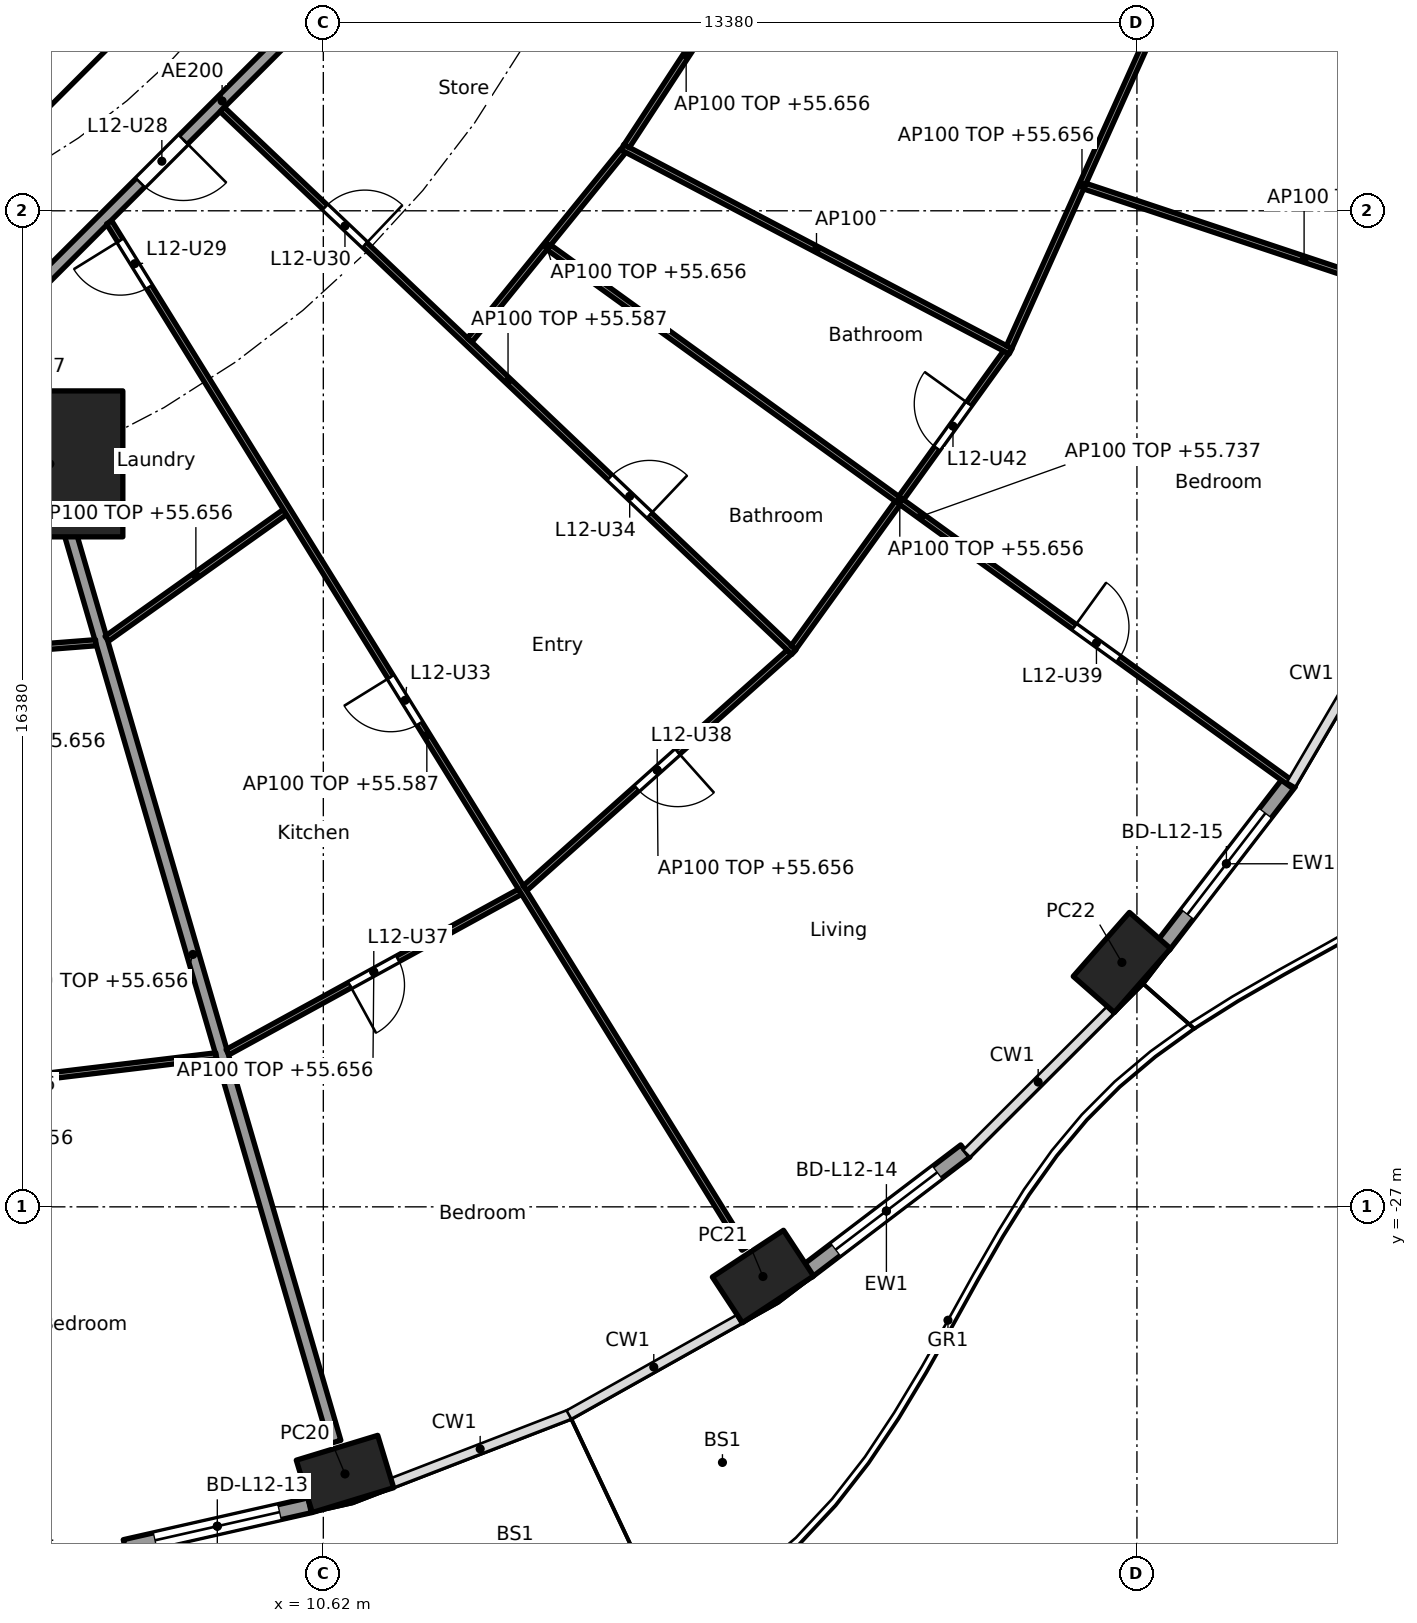
"""IFC4 building model, lengths in metres.
Left out: names, types, materials, properties, quantities, classifications, styles, units other than length and angle.
Written with IfcOpenShell. Run it as: python <this file> out.ifc"""

import sys

from ifc_helpers import new_model, si_unit, direction, frame, frame_2d, origin, origin_2d, place, context, subcontext, project, spatial, rectangle, hollow_rectangle, extrude, element, fill, save


model = new_model("IFC4")
c1 = context("Model", 3, precision=1e-05, world=origin(), true_north=direction((0.0, 1.0)))
c2 = subcontext(c1, "Body", "Model", "MODEL_VIEW")
j1 = project(units=[si_unit("LENGTHUNIT", "METRE"), si_unit("PLANEANGLEUNIT", "RADIAN")], contexts=[c1])
p1 = place(None, origin())
s1 = spatial("IfcSite", under=j1, at=p1, CompositionType="ELEMENT")
p2 = place(p1, origin())
s2 = spatial("IfcBuilding", under=s1, at=p2, CompositionType="ELEMENT")
p3 = place(p2, frame((0.0, 0.0, 52.9)))
s3 = spatial("IfcBuildingStorey", under=s2, at=p3, CompositionType="ELEMENT", Elevation=52.9)
for number, where, z_axis, x_axis in (
    (1, (10.976, -31.393, 0.0), (0.0, 0.0, 1.0), (0.957, 0.292, 0.0)),
    (2, (17.85, -28.146, 0.0), (0.0, 0.0, 1.0), (0.836, 0.549, 0.0)),
    (3, (23.752, -22.981, 0.0), (0.0, 0.0, 1.0), (0.66, 0.751, 0.0)),
):
    element("IfcColumn", number, at=place(p3, frame(where, z_axis=z_axis, x_axis=x_axis)), inside=s3, PredefinedType="COLUMN", context=c2, shape_type="SweptSolid", body=[
        extrude(hollow_rectangle(XDim=1.4, YDim=0.9, WallThickness=0.05, at=origin_2d()), origin(), (0.0, 0.0, 1.0), 3.7),
    ])
p4 = place(p3, frame((6.123, -14.782, 0.0), z_axis=(0.0, 0.0, 1.0), x_axis=(1.0, 0.0, 0.0)))
e4 = element("IfcColumn", 4, at=p4, inside=s3, PredefinedType="COLUMN", context=c2, shape_type="SweptSolid", body=[
    extrude(rectangle(XDim=2.4, YDim=2.4, at=origin_2d()), origin(), (0.0, 0.0, 1.0), 3.7),
])
p5 = place(p3, frame((10.396, -31.908, 0.0), z_axis=(0.0, 0.0, 1.0), x_axis=(-0.97533495413, -0.220729987208, 0.0)))
e5 = element("IfcWall", 5, at=p5, inside=s3, PredefinedType="SOLIDWALL", context=c2, shape_type="SweptSolid", body=[
    extrude(rectangle(XDim=3.115, YDim=0.25, at=frame_2d((1.557, 0.0))), origin(), (0.0, 0.0, 1.0), 3.44),
])
p6 = place(p5, frame((0.507, 0.0, 0.0)))
e6 = element("IfcOpeningElement", 6, at=p6, cuts=e5, PredefinedType="OPENING", context=c2, shape_type="SweptSolid", body=[
    extrude(rectangle(XDim=2.1, YDim=2.4, at=frame_2d((1.05, 1.2))), frame((0.0, 0.135, 0.0), z_axis=(0.0, -1.0, 0.0), x_axis=(1.0, 0.0, 0.0)), (0.0, 0.0, 1.0), 0.27),
])
p7 = place(p3, frame((21.178, -26.081, 0.0), z_axis=(0.0, 0.0, 1.0), x_axis=(-0.796022293214, -0.605267303517, 0.0)))
e7 = element("IfcWall", 7, at=p7, inside=s3, PredefinedType="SOLIDWALL", context=c2, shape_type="SweptSolid", body=[
    extrude(rectangle(XDim=3.262, YDim=0.25, at=frame_2d((1.631, 0.0))), origin(), (0.0, 0.0, 1.0), 3.44),
])
p8 = place(p7, frame((0.581, 0.0, 0.0)))
e8 = element("IfcOpeningElement", 8, at=p8, cuts=e7, PredefinedType="OPENING", context=c2, shape_type="SweptSolid", body=[
    extrude(rectangle(XDim=2.1, YDim=2.4, at=frame_2d((1.05, 1.2))), frame((0.0, 0.135, 0.0), z_axis=(0.0, -1.0, 0.0), x_axis=(1.0, 0.0, 0.0)), (0.0, 0.0, 1.0), 0.27),
])
p9 = place(p3, frame((26.508, -20.013, 0.0), z_axis=(0.0, 0.0, 1.0), x_axis=(-0.610457147657, -0.792049285635, 0.0)))
e9 = element("IfcWall", 9, at=p9, inside=s3, PredefinedType="SOLIDWALL", context=c2, shape_type="SweptSolid", body=[
    extrude(rectangle(XDim=3.397, YDim=0.25, at=frame_2d((1.699, 0.0))), origin(), (0.0, 0.0, 1.0), 3.44),
])
p10 = place(p9, frame((0.649, 0.0, 0.0)))
e10 = element("IfcOpeningElement", 10, at=p10, cuts=e9, PredefinedType="OPENING", context=c2, shape_type="SweptSolid", body=[
    extrude(rectangle(XDim=2.1, YDim=2.4, at=frame_2d((1.05, 1.2))), frame((0.0, 0.135, 0.0), z_axis=(0.0, -1.0, 0.0), x_axis=(1.0, 0.0, 0.0)), (0.0, 0.0, 1.0), 0.27),
])
p11 = place(p3, frame((4.613, -9.988, 0.0), z_axis=(0.0, 0.0, 1.0), x_axis=(0.707106781187, 0.707106781187, 0.0)))
e11 = element("IfcWall", 11, at=p11, inside=s3, PredefinedType="SHEAR", context=c2, shape_type="SweptSolid", body=[
    extrude(rectangle(XDim=7.602, YDim=0.6, at=frame_2d((3.801, 0.0))), origin(), (0.0, 0.0, 1.0), 3.44),
])
p12 = place(p11, frame((3.201, 0.0, 0.0)))
e12 = element("IfcOpeningElement", 12, at=p12, cuts=e11, PredefinedType="OPENING", context=c2, shape_type="SweptSolid", body=[
    extrude(rectangle(XDim=1.2, YDim=2.1, at=frame_2d((0.6, 1.05))), frame((0.0, 0.31, 0.0), z_axis=(0.0, -1.0, 0.0), x_axis=(1.0, 0.0, 0.0)), (0.0, 0.0, 1.0), 0.62),
])
p13 = place(p3, frame((5.243, -12.657, 0.0), z_axis=(0.0, 0.0, 1.0), x_axis=(0.382707856524, -0.923869415315, 0.0)))
e13 = element("IfcWall", 13, at=p13, inside=s3, PredefinedType="PARTITIONING", context=c2, shape_type="SweptSolid", body=[
    extrude(rectangle(XDim=2.2, YDim=0.2, at=frame_2d((1.1, 0.0))), origin(), (0.0, 0.0, 1.0), 3.44),
])
p14 = place(p3, frame((6.137, -14.83, 0.0), z_axis=(0.0, 0.0, 1.0), x_axis=(0.27985745069, -0.960041565399, 0.0)))
e14 = element("IfcWall", 14, at=p14, inside=s3, PredefinedType="PARTITIONING", context=c2, shape_type="SweptSolid", body=[
    extrude(rectangle(XDim=16.705, YDim=0.2, at=frame_2d((8.353, 0.0))), origin(), (0.0, 0.0, 1.0), 2.756),
])
p15 = place(p3, frame((5.275, -12.494, 0.0), z_axis=(0.0, 0.0, 1.0), x_axis=(0.707106781187, 0.707106781187, 0.0)))
e15 = element("IfcWall", 15, at=p15, inside=s3, PredefinedType="PARTITIONING", context=c2, shape_type="SweptSolid", body=[
    extrude(rectangle(XDim=10.409, YDim=0.2, at=frame_2d((5.205, 0.0))), origin(), (0.0, 0.0, 1.0), 3.44),
])
p16 = place(p15, frame((3.303, 0.0, 0.0)))
e16 = element("IfcOpeningElement", 16, at=p16, cuts=e15, PredefinedType="OPENING", context=c2, shape_type="SweptSolid", body=[
    extrude(rectangle(XDim=1.0, YDim=2.1, at=frame_2d((0.5, 1.05))), frame((0.0, 0.11, 0.0), z_axis=(0.0, -1.0, 0.0), x_axis=(1.0, 0.0, 0.0)), (0.0, 0.0, 1.0), 0.22),
])
p17 = place(p3, frame((2.288, -18.078, 0.0), z_axis=(0.0, 0.0, 1.0), x_axis=(0.99701850123, 0.077162868047, 0.0)))
e17 = element("IfcWall", 17, at=p17, inside=s3, PredefinedType="PARTITIONING", context=c2, shape_type="SweptSolid", body=[
    extrude(rectangle(XDim=4.604, YDim=0.1, at=frame_2d((2.302, 0.0))), origin(), (0.0, 0.0, 1.0), 2.756),
])
p18 = place(p17, frame((1.852, 0.0, 0.0)))
e18 = element("IfcOpeningElement", 18, at=p18, cuts=e17, PredefinedType="OPENING", context=c2, shape_type="SweptSolid", body=[
    extrude(rectangle(XDim=0.9, YDim=2.1, at=frame_2d((0.45, 1.05))), frame((0.0, 0.06, 0.0), z_axis=(0.0, -1.0, 0.0), x_axis=(1.0, 0.0, 0.0)), (0.0, 0.0, 1.0), 0.12),
])
p19 = place(p3, frame((2.941, -25.229, 0.0), z_axis=(0.0, 0.0, 1.0), x_axis=(0.992834127896, 0.119500604542, 0.0)))
e19 = element("IfcWall", 19, at=p19, inside=s3, PredefinedType="PARTITIONING", context=c2, shape_type="SweptSolid", body=[
    extrude(rectangle(XDim=5.959, YDim=0.1, at=frame_2d((2.98, 0.0))), origin(), (0.0, 0.0, 1.0), 2.756),
])
p20 = place(p3, frame((7.06, -17.657, 0.0), z_axis=(0.0, 0.0, 1.0), x_axis=(0.81492039338, 0.57957290521, 0.0)))
e20 = element("IfcWall", 20, at=p20, inside=s3, PredefinedType="PARTITIONING", context=c2, shape_type="SweptSolid", body=[
    extrude(rectangle(XDim=3.594, YDim=0.1, at=frame_2d((1.797, 0.0))), origin(), (0.0, 0.0, 1.0), 2.756),
])
p21 = place(p3, frame((9.045, -24.456, 0.0), z_axis=(0.0, 0.0, 1.0), x_axis=(0.876809987787, 0.480837025734, 0.0)))
e21 = element("IfcWall", 21, at=p21, inside=s3, PredefinedType="PARTITIONING", context=c2, shape_type="SweptSolid", body=[
    extrude(rectangle(XDim=5.486, YDim=0.1, at=frame_2d((2.743, 0.0))), origin(), (0.0, 0.0, 1.0), 2.756),
])
p22 = place(p21, frame((2.293, 0.0, 0.0)))
e22 = element("IfcOpeningElement", 22, at=p22, cuts=e21, PredefinedType="OPENING", context=c2, shape_type="SweptSolid", body=[
    extrude(rectangle(XDim=0.9, YDim=2.1, at=frame_2d((0.45, 1.05))), frame((0.0, 0.06, 0.0), z_axis=(0.0, -1.0, 0.0), x_axis=(1.0, 0.0, 0.0)), (0.0, 0.0, 1.0), 0.12),
])
p23 = place(p3, frame((7.097, -10.81, 0.0), z_axis=(0.0, 0.0, 1.0), x_axis=(0.526453266471, -0.850204068576, 0.0)))
e23 = element("IfcWall", 23, at=p23, inside=s3, PredefinedType="PARTITIONING", context=c2, shape_type="SweptSolid", body=[
    extrude(rectangle(XDim=19.85, YDim=0.1, at=frame_2d((9.925, 0.0))), origin(), (0.0, 0.0, 1.0), 2.687),
])
p24 = place(p23, frame((0.35, 0.0, 0.0)))
e24 = element("IfcOpeningElement", 24, at=p24, cuts=e23, PredefinedType="OPENING", context=c2, shape_type="SweptSolid", body=[
    extrude(rectangle(XDim=0.9, YDim=2.1, at=frame_2d((0.45, 1.05))), frame((0.0, 0.06, 0.0), z_axis=(0.0, -1.0, 0.0), x_axis=(1.0, 0.0, 0.0)), (0.0, 0.0, 1.0), 0.12),
])
p25 = place(p23, frame((8.795, 0.0, 0.0)))
e25 = element("IfcOpeningElement", 25, at=p25, cuts=e23, PredefinedType="OPENING", context=c2, shape_type="SweptSolid", body=[
    extrude(rectangle(XDim=0.9, YDim=2.1, at=frame_2d((0.45, 1.05))), frame((0.0, 0.06, 0.0), z_axis=(0.0, -1.0, 0.0), x_axis=(1.0, 0.0, 0.0)), (0.0, 0.0, 1.0), 0.12),
])
p26 = place(p3, frame((13.936, -21.761, 0.0), z_axis=(0.0, 0.0, 1.0), x_axis=(0.745806142791, 0.666163041136, 0.0)))
e26 = element("IfcWall", 26, at=p26, inside=s3, PredefinedType="PARTITIONING", context=c2, shape_type="SweptSolid", body=[
    extrude(rectangle(XDim=5.831, YDim=0.1, at=frame_2d((2.915, 0.0))), origin(), (0.0, 0.0, 1.0), 2.756),
])
p27 = place(p26, frame((2.465, 0.0, 0.0)))
e27 = element("IfcOpeningElement", 27, at=p27, cuts=e26, PredefinedType="OPENING", context=c2, shape_type="SweptSolid", body=[
    extrude(rectangle(XDim=0.9, YDim=2.1, at=frame_2d((0.45, 1.05))), frame((0.0, 0.06, 0.0), z_axis=(0.0, -1.0, 0.0), x_axis=(1.0, 0.0, 0.0)), (0.0, 0.0, 1.0), 0.12),
])
p28 = place(p3, frame((8.957, -8.953, 0.0), z_axis=(0.0, 0.0, 1.0), x_axis=(0.725250022034, -0.688485588476, 0.0)))
e28 = element("IfcWall", 28, at=p28, inside=s3, PredefinedType="PARTITIONING", context=c2, shape_type="SweptSolid", body=[
    extrude(rectangle(XDim=12.963, YDim=0.1, at=frame_2d((6.481, 0.0))), origin(), (0.0, 0.0, 1.0), 2.687),
])
p29 = place(p28, frame((2.333, 0.0, 0.0)))
e29 = element("IfcOpeningElement", 29, at=p29, cuts=e28, PredefinedType="OPENING", context=c2, shape_type="SweptSolid", body=[
    extrude(rectangle(XDim=0.9, YDim=2.1, at=frame_2d((0.45, 1.05))), frame((0.0, 0.06, 0.0), z_axis=(0.0, -1.0, 0.0), x_axis=(1.0, 0.0, 0.0)), (0.0, 0.0, 1.0), 0.12),
])
p30 = place(p28, frame((8.79, 0.0, 0.0)))
e30 = element("IfcOpeningElement", 30, at=p30, cuts=e28, PredefinedType="OPENING", context=c2, shape_type="SweptSolid", body=[
    extrude(rectangle(XDim=0.9, YDim=2.1, at=frame_2d((0.45, 1.05))), frame((0.0, 0.06, 0.0), z_axis=(0.0, -1.0, 0.0), x_axis=(1.0, 0.0, 0.0)), (0.0, 0.0, 1.0), 0.12),
])
p31 = place(p3, frame((13.026, -12.747, 0.0), z_axis=(0.0, 0.0, 1.0), x_axis=(0.630126826288, 0.776492229705, 0.0)))
e31 = element("IfcWall", 31, at=p31, inside=s3, PredefinedType="PARTITIONING", context=c2, shape_type="SweptSolid", body=[
    extrude(rectangle(XDim=4.007, YDim=0.1, at=frame_2d((2.003, 0.0))), origin(), (0.0, 0.0, 1.0), 2.756),
])
p32 = place(p3, frame((18.351, -17.803, 0.0), z_axis=(0.0, 0.0, 1.0), x_axis=(0.584563700282, 0.811347817099, 0.0)))
e32 = element("IfcWall", 32, at=p32, inside=s3, PredefinedType="PARTITIONING", context=c2, shape_type="SweptSolid", body=[
    extrude(rectangle(XDim=5.984, YDim=0.1, at=frame_2d((2.992, 0.0))), origin(), (0.0, 0.0, 1.0), 2.756),
])
p33 = place(p32, frame((4.038, 0.0, 0.0)))
e33 = element("IfcOpeningElement", 33, at=p33, cuts=e32, PredefinedType="OPENING", context=c2, shape_type="SweptSolid", body=[
    extrude(rectangle(XDim=0.9, YDim=2.1, at=frame_2d((0.45, 1.05))), frame((0.0, 0.06, 0.0), z_axis=(0.0, -1.0, 0.0), x_axis=(1.0, 0.0, 0.0)), (0.0, 0.0, 1.0), 0.12),
])
p34 = place(p3, frame((14.329, -11.221, 0.0), z_axis=(0.0, 0.0, 1.0), x_axis=(0.810671130917, -0.58550176558, 0.0)))
e34 = element("IfcWall", 34, at=p34, inside=s3, PredefinedType="PARTITIONING", context=c2, shape_type="SweptSolid", body=[
    extrude(rectangle(XDim=15.106, YDim=0.1, at=frame_2d((7.553, 0.0))), origin(), (0.0, 0.0, 1.0), 2.837),
])
p35 = place(p34, frame((10.659, 0.0, 0.0)))
e35 = element("IfcOpeningElement", 35, at=p35, cuts=e34, PredefinedType="OPENING", context=c2, shape_type="SweptSolid", body=[
    extrude(rectangle(XDim=0.9, YDim=2.1, at=frame_2d((0.45, 1.05))), frame((0.0, 0.06, 0.0), z_axis=(0.0, -1.0, 0.0), x_axis=(1.0, 0.0, 0.0)), (0.0, 0.0, 1.0), 0.12),
])
p36 = place(p3, frame((15.538, -9.574, 0.0), z_axis=(0.0, 0.0, 1.0), x_axis=(0.88517945493, -0.465249752895, 0.0)))
e36 = element("IfcWall", 36, at=p36, inside=s3, PredefinedType="PARTITIONING", context=c2, shape_type="SweptSolid", body=[
    extrude(rectangle(XDim=7.213, YDim=0.1, at=frame_2d((3.606, 0.0))), origin(), (0.0, 0.0, 1.0), 3.44),
])
p37 = place(p3, frame((15.609, -9.556, 0.0), z_axis=(0.0, 0.0, 1.0), x_axis=(0.547641765292, 0.836712911881, 0.0)))
e37 = element("IfcWall", 37, at=p37, inside=s3, PredefinedType="PARTITIONING", context=c2, shape_type="SweptSolid", body=[
    extrude(rectangle(XDim=3.57, YDim=0.1, at=frame_2d((1.785, 0.0))), origin(), (0.0, 0.0, 1.0), 2.756),
])
p38 = place(p3, frame((21.899, -12.861, 0.0), z_axis=(0.0, 0.0, 1.0), x_axis=(0.410197710154, 0.911996622025, 0.0)))
e38 = element("IfcWall", 38, at=p38, inside=s3, PredefinedType="PARTITIONING", context=c2, shape_type="SweptSolid", body=[
    extrude(rectangle(XDim=5.837, YDim=0.1, at=frame_2d((2.918, 0.0))), origin(), (0.0, 0.0, 1.0), 2.756),
])
p39 = place(p3, frame((23.144, -10.216, 0.0), z_axis=(0.0, 0.0, 1.0), x_axis=(0.948811715359, -0.315842253027, 0.0)))
e39 = element("IfcWall", 39, at=p39, inside=s3, PredefinedType="PARTITIONING", context=c2, shape_type="SweptSolid", body=[
    extrude(rectangle(XDim=7.6, YDim=0.1, at=frame_2d((3.8, 0.0))), origin(), (0.0, 0.0, 1.0), 2.837),
])
p40 = place(p6, origin())
e40 = element("IfcDoor", 40, at=p40, inside=s3, OperationType="SLIDING_TO_LEFT", PredefinedType="DOOR", context=c2, shape_type="SweptSolid", body=[
    extrude(rectangle(XDim=2.1, YDim=2.4, at=frame_2d((1.05, 1.2))), frame((0.0, 0.025, 0.0), z_axis=(0.0, -1.0, 0.0), x_axis=(1.0, 0.0, 0.0)), (0.0, 0.0, 1.0), 0.05),
])
fill(e6, e40)
p41 = place(p8, origin())
e41 = element("IfcDoor", 41, at=p41, inside=s3, OperationType="SLIDING_TO_LEFT", PredefinedType="DOOR", context=c2, shape_type="SweptSolid", body=[
    extrude(rectangle(XDim=2.1, YDim=2.4, at=frame_2d((1.05, 1.2))), frame((0.0, 0.025, 0.0), z_axis=(0.0, -1.0, 0.0), x_axis=(1.0, 0.0, 0.0)), (0.0, 0.0, 1.0), 0.05),
])
fill(e8, e41)
p42 = place(p10, origin())
e42 = element("IfcDoor", 42, at=p42, inside=s3, OperationType="SLIDING_TO_LEFT", PredefinedType="DOOR", context=c2, shape_type="SweptSolid", body=[
    extrude(rectangle(XDim=2.1, YDim=2.4, at=frame_2d((1.05, 1.2))), frame((0.0, 0.025, 0.0), z_axis=(0.0, -1.0, 0.0), x_axis=(1.0, 0.0, 0.0)), (0.0, 0.0, 1.0), 0.05),
])
fill(e10, e42)
p43 = place(p16, frame((1.0, 0.0, 0.0), x_axis=(-1.0, 0.0, 0.0)))
e43 = element("IfcDoor", 43, at=p43, inside=s3, OperationType="SINGLE_SWING_LEFT", PredefinedType="DOOR", context=c2, shape_type="SweptSolid", body=[
    extrude(rectangle(XDim=1.0, YDim=2.1, at=frame_2d((0.5, 1.05))), frame((0.0, 0.025, 0.0), z_axis=(0.0, -1.0, 0.0), x_axis=(1.0, 0.0, 0.0)), (0.0, 0.0, 1.0), 0.05),
])
fill(e16, e43)
p44 = place(p24, frame((0.9, 0.0, 0.0), x_axis=(-1.0, 0.0, 0.0)))
e44 = element("IfcDoor", 44, at=p44, inside=s3, OperationType="SINGLE_SWING_RIGHT", PredefinedType="DOOR", context=c2, shape_type="SweptSolid", body=[
    extrude(rectangle(XDim=0.9, YDim=2.1, at=frame_2d((0.45, 1.05))), frame((0.0, 0.025, 0.0), z_axis=(0.0, -1.0, 0.0), x_axis=(1.0, 0.0, 0.0)), (0.0, 0.0, 1.0), 0.05),
])
fill(e24, e44)
p45 = place(p29, origin())
e45 = element("IfcDoor", 45, at=p45, inside=s3, OperationType="SINGLE_SWING_RIGHT", PredefinedType="DOOR", context=c2, shape_type="SweptSolid", body=[
    extrude(rectangle(XDim=0.9, YDim=2.1, at=frame_2d((0.45, 1.05))), frame((0.0, 0.025, 0.0), z_axis=(0.0, -1.0, 0.0), x_axis=(1.0, 0.0, 0.0)), (0.0, 0.0, 1.0), 0.05),
])
fill(e29, e45)
p46 = place(p25, frame((0.9, 0.0, 0.0), x_axis=(-1.0, 0.0, 0.0)))
e46 = element("IfcDoor", 46, at=p46, inside=s3, OperationType="SINGLE_SWING_RIGHT", PredefinedType="DOOR", context=c2, shape_type="SweptSolid", body=[
    extrude(rectangle(XDim=0.9, YDim=2.1, at=frame_2d((0.45, 1.05))), frame((0.0, 0.025, 0.0), z_axis=(0.0, -1.0, 0.0), x_axis=(1.0, 0.0, 0.0)), (0.0, 0.0, 1.0), 0.05),
])
fill(e25, e46)
p47 = place(p30, origin())
e47 = element("IfcDoor", 47, at=p47, inside=s3, OperationType="SINGLE_SWING_RIGHT", PredefinedType="DOOR", context=c2, shape_type="SweptSolid", body=[
    extrude(rectangle(XDim=0.9, YDim=2.1, at=frame_2d((0.45, 1.05))), frame((0.0, 0.025, 0.0), z_axis=(0.0, -1.0, 0.0), x_axis=(1.0, 0.0, 0.0)), (0.0, 0.0, 1.0), 0.05),
])
fill(e30, e47)
p48 = place(p22, frame((0.9, 0.0, 0.0), x_axis=(-1.0, 0.0, 0.0)))
e48 = element("IfcDoor", 48, at=p48, inside=s3, OperationType="SINGLE_SWING_RIGHT", PredefinedType="DOOR", context=c2, shape_type="SweptSolid", body=[
    extrude(rectangle(XDim=0.9, YDim=2.1, at=frame_2d((0.45, 1.05))), frame((0.0, 0.025, 0.0), z_axis=(0.0, -1.0, 0.0), x_axis=(1.0, 0.0, 0.0)), (0.0, 0.0, 1.0), 0.05),
])
fill(e22, e48)
p49 = place(p27, frame((0.9, 0.0, 0.0), x_axis=(-1.0, 0.0, 0.0)))
e49 = element("IfcDoor", 49, at=p49, inside=s3, OperationType="SINGLE_SWING_LEFT", PredefinedType="DOOR", context=c2, shape_type="SweptSolid", body=[
    extrude(rectangle(XDim=0.9, YDim=2.1, at=frame_2d((0.45, 1.05))), frame((0.0, 0.025, 0.0), z_axis=(0.0, -1.0, 0.0), x_axis=(1.0, 0.0, 0.0)), (0.0, 0.0, 1.0), 0.05),
])
fill(e27, e49)
p50 = place(p35, origin())
e50 = element("IfcDoor", 50, at=p50, inside=s3, OperationType="SINGLE_SWING_LEFT", PredefinedType="DOOR", context=c2, shape_type="SweptSolid", body=[
    extrude(rectangle(XDim=0.9, YDim=2.1, at=frame_2d((0.45, 1.05))), frame((0.0, 0.025, 0.0), z_axis=(0.0, -1.0, 0.0), x_axis=(1.0, 0.0, 0.0)), (0.0, 0.0, 1.0), 0.05),
])
fill(e35, e50)
p51 = place(p33, origin())
e51 = element("IfcDoor", 51, at=p51, inside=s3, OperationType="SINGLE_SWING_RIGHT", PredefinedType="DOOR", context=c2, shape_type="SweptSolid", body=[
    extrude(rectangle(XDim=0.9, YDim=2.1, at=frame_2d((0.45, 1.05))), frame((0.0, 0.025, 0.0), z_axis=(0.0, -1.0, 0.0), x_axis=(1.0, 0.0, 0.0)), (0.0, 0.0, 1.0), 0.05),
])
fill(e33, e51)
save(model, sys.argv[1])
